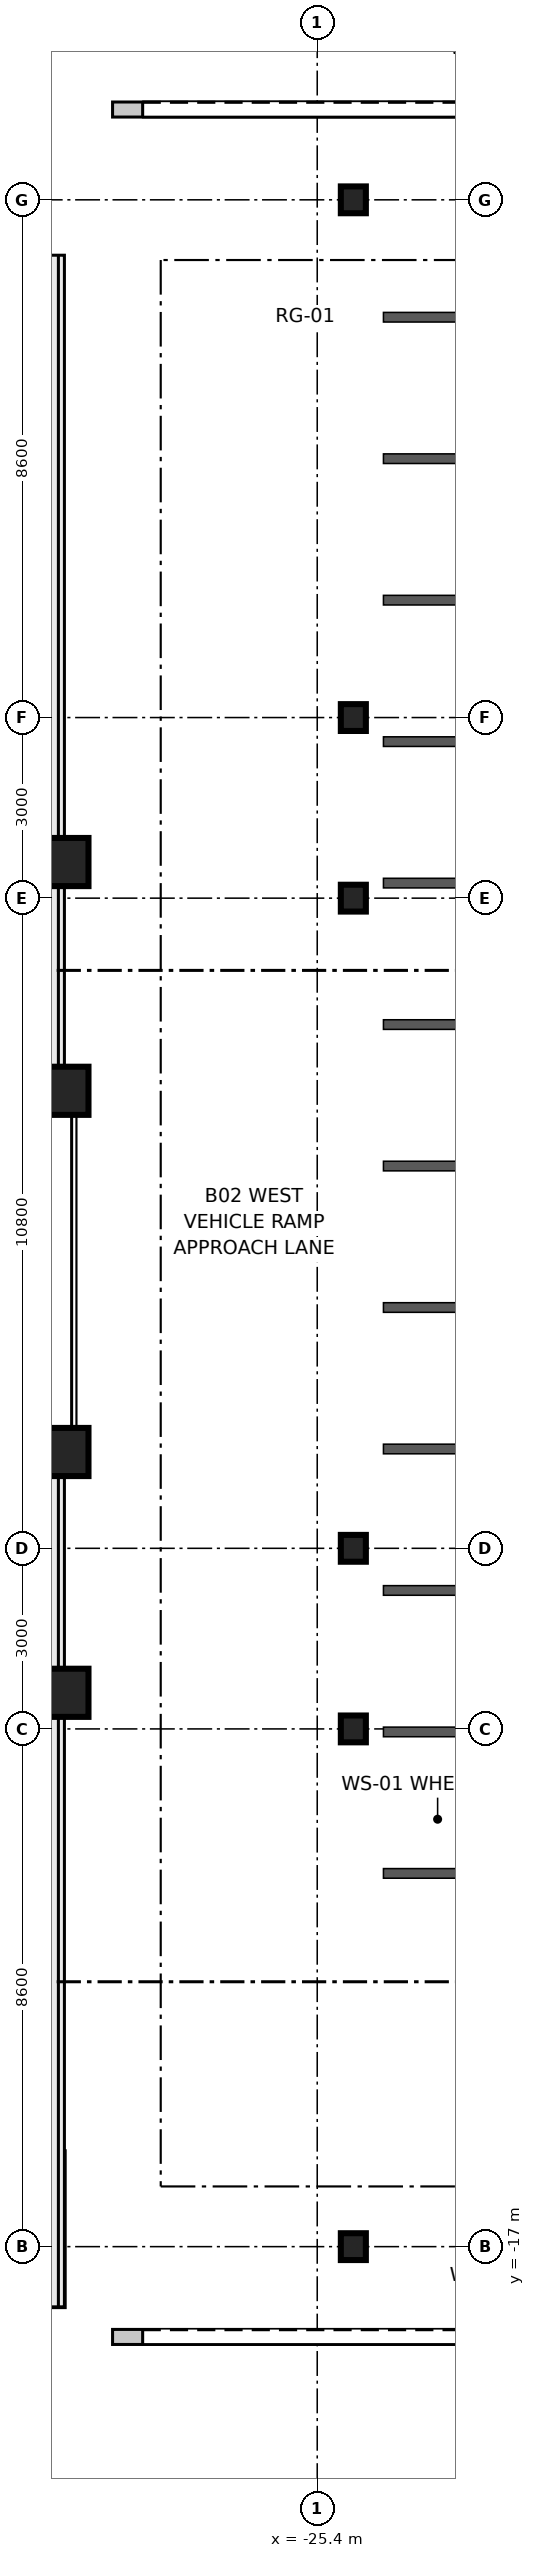
"""IFC4 building model, lengths in metres.
Left out: names, types, materials, properties, quantities, classifications, styles, units other than length and angle.
Written with IfcOpenShell. Run it as: python <this file> out.ifc"""

import sys

from ifc_helpers import new_model, si_unit, direction, frame, frame_2d, origin, origin_2d, place, context, subcontext, project, spatial, rectangle, i_section, extrude, source, transform, mapped, element, fill, save


model = new_model("IFC4")
c1 = context("Model", 3, precision=1e-05, world=origin(), true_north=direction((0.0, 1.0)))
c2 = subcontext(c1, "Body", "Model", "MODEL_VIEW")
j1 = project(units=[si_unit("LENGTHUNIT", "METRE"), si_unit("PLANEANGLEUNIT", "RADIAN")], contexts=[c1])
p1 = place(None, origin())
s1 = spatial("IfcSite", under=j1, at=p1, CompositionType="ELEMENT")
p2 = place(p1, origin())
s2 = spatial("IfcBuilding", under=s1, at=p2, CompositionType="ELEMENT")
p3 = place(p2, frame((0.0, 0.0, -10.8)))
s3 = spatial("IfcBuildingStorey", under=s2, at=p3, CompositionType="ELEMENT", Elevation=-10.8)
m1 = source(origin(), c2, "Body", "SweptSolid", [
    extrude(rectangle(XDim=0.8, YDim=0.8, at=origin_2d()), origin(), (0.0, 0.0, 1.0), 5.355),
])
for number, where, z_axis, x_axis in (
    (1, (-29.6, -7.8, 0.0), (0.0, 0.0, 1.0), (1.0, 0.0, 0.0)),
    (2, (-29.6, -3.8, 0.0), (0.0, 0.0, 1.0), (1.0, 0.0, 0.0)),
    (3, (-29.6, 2.2, 0.0), (0.0, 0.0, 1.0), (1.0, 0.0, 0.0)),
    (4, (-29.6, 6.0, 0.0), (0.0, 0.0, 1.0), (1.0, 0.0, 0.0)),
):
    element("IfcColumn", number, at=place(p3, frame(where, z_axis=z_axis, x_axis=x_axis)), inside=s3, PredefinedType="COLUMN", context=c2, shape_type="MappedRepresentation", body=[
        mapped(m1, transform((0.0, 0.0, 0.0), scale=1.0)),
    ])
m2 = source(origin(), c2, "Body", "SweptSolid", [
    extrude(i_section(OverallWidth=0.416, OverallDepth=0.446, WebThickness=0.025, FlangeThickness=0.04, at=origin_2d()), origin(), (0.0, 0.0, 1.0), 5.355),
])
for number, where, z_axis, x_axis in (
    (5, (-24.8, -17.0, 0.0), (0.0, 0.0, 1.0), (1.0, 0.0, 0.0)),
    (6, (-24.8, -8.4, 0.0), (0.0, 0.0, 1.0), (1.0, 0.0, 0.0)),
    (7, (-24.8, -5.4, 0.0), (0.0, 0.0, 1.0), (1.0, 0.0, 0.0)),
    (8, (-24.8, 5.4, 0.0), (0.0, 0.0, 1.0), (1.0, 0.0, 0.0)),
    (9, (-24.8, 8.4, 0.0), (0.0, 0.0, 1.0), (1.0, 0.0, 0.0)),
    (10, (-24.8, 17.0, 0.0), (0.0, 0.0, 1.0), (1.0, 0.0, 0.0)),
):
    element("IfcColumn", number, at=place(p3, frame(where, z_axis=z_axis, x_axis=x_axis)), inside=s3, PredefinedType="COLUMN", context=c2, shape_type="MappedRepresentation", body=[
        mapped(m2, transform((0.0, 0.0, 0.0), scale=1.0)),
    ])
m3 = source(origin(), c2, "Body", "SweptSolid", [
    extrude(rectangle(XDim=6.4, YDim=0.25, at=frame_2d((3.2, 0.0))), origin(), (0.0, 0.0, 1.0), 4.95),
])
p4 = place(p3, frame((-28.8, -18.5, 0.0), z_axis=(0.0, 0.0, 1.0), x_axis=(1.0, 0.0, 0.0)))
e11 = element("IfcWall", 11, at=p4, inside=s3, PredefinedType="PARTITIONING", context=c2, shape_type="MappedRepresentation", body=[
    mapped(m3, transform((0.0, 0.0, 0.0), scale=1.0)),
])
p5 = place(p4, frame((0.5, 0.0, 0.0)))
e12 = element("IfcOpeningElement", 12, at=p5, cuts=e11, PredefinedType="OPENING", context=c2, shape_type="SweptSolid", body=[
    extrude(rectangle(XDim=5.4, YDim=3.1, at=frame_2d((2.7, 1.55))), frame((0.0, 0.135, 0.0), z_axis=(0.0, -1.0, 0.0), x_axis=(1.0, 0.0, 0.0)), (0.0, 0.0, 1.0), 0.27),
])
p6 = place(p3, frame((-28.8, 18.5, 0.0), z_axis=(0.0, 0.0, 1.0), x_axis=(1.0, 0.0, 0.0)))
e13 = element("IfcWall", 13, at=p6, inside=s3, PredefinedType="PARTITIONING", context=c2, shape_type="MappedRepresentation", body=[
    mapped(m3, transform((0.0, 0.0, 0.0), scale=1.0)),
])
p7 = place(p6, frame((0.5, 0.0, 0.0)))
e14 = element("IfcOpeningElement", 14, at=p7, cuts=e13, PredefinedType="OPENING", context=c2, shape_type="SweptSolid", body=[
    extrude(rectangle(XDim=5.4, YDim=3.1, at=frame_2d((2.7, 1.55))), frame((0.0, 0.135, 0.0), z_axis=(0.0, -1.0, 0.0), x_axis=(1.0, 0.0, 0.0)), (0.0, 0.0, 1.0), 0.27),
])
m4 = source(origin(), c2, "Body", "SweptSolid", [
    extrude(rectangle(XDim=5.4, YDim=3.1, at=frame_2d((2.7, 1.55))), frame((0.0, 0.025, 0.0), z_axis=(0.0, -1.0, 0.0), x_axis=(1.0, 0.0, 0.0)), (0.0, 0.0, 1.0), 0.05),
])
p8 = place(p5, origin())
e15 = element("IfcDoor", 15, at=p8, inside=s3, OperationType="ROLLINGUP", PredefinedType="GATE", context=c2, shape_type="MappedRepresentation", body=[
    mapped(m4, transform((0.0, 0.0, 0.0), scale=1.0)),
])
fill(e12, e15)
p9 = place(p7, origin())
e16 = element("IfcDoor", 16, at=p9, inside=s3, OperationType="ROLLINGUP", PredefinedType="GATE", context=c2, shape_type="MappedRepresentation", body=[
    mapped(m4, transform((0.0, 0.0, 0.0), scale=1.0)),
])
fill(e14, e16)
save(model, sys.argv[1])
